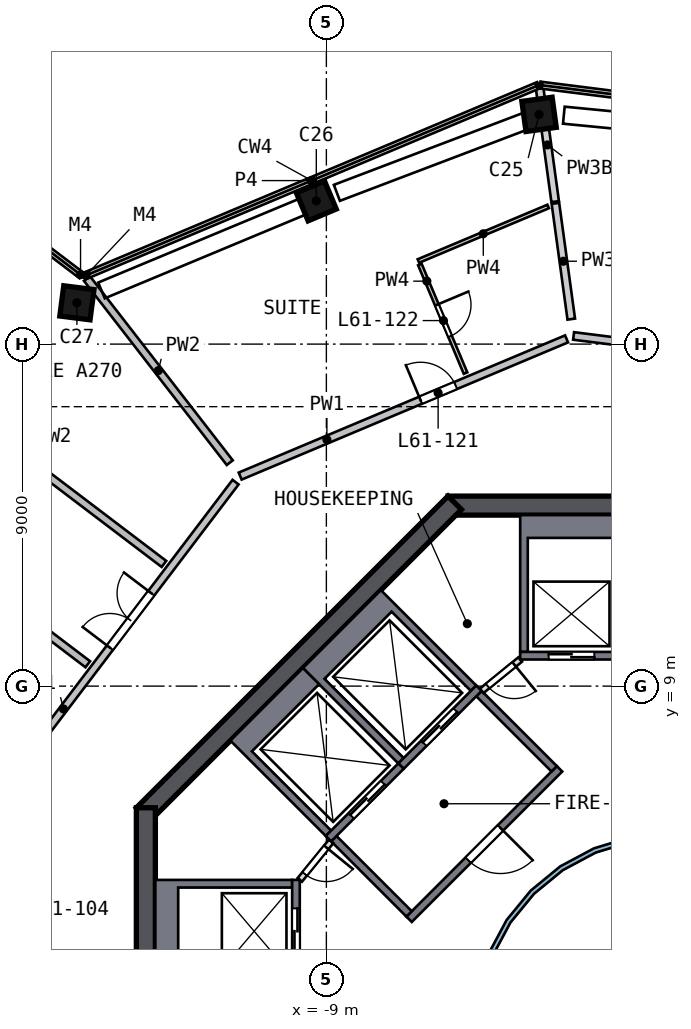
"""IFC4 building model, lengths in metres.
Left out: names, types, materials, properties, quantities, classifications, styles, units other than length and angle.
Written with IfcOpenShell. Run it as: python <this file> out.ifc"""

import sys

from ifc_helpers import new_model, si_unit, direction, frame, frame_2d, origin, origin_2d, place, context, subcontext, project, spatial, polyline, rectangle, outline, extrude, element, fill, save


model = new_model("IFC4")
c1 = context("Model", 3, precision=1e-05, world=origin(), true_north=direction((0.0, 1.0)))
c2 = subcontext(c1, "Body", "Model", "MODEL_VIEW")
j1 = project(units=[si_unit("LENGTHUNIT", "METRE"), si_unit("PLANEANGLEUNIT", "RADIAN")], contexts=[c1])
p1 = place(None, origin())
s1 = spatial("IfcSite", under=j1, at=p1, CompositionType="ELEMENT")
p2 = place(p1, origin())
s2 = spatial("IfcBuilding", under=s1, at=p2, CompositionType="ELEMENT")
p3 = place(p2, frame((0.0, 0.0, 248.0)))
s3 = spatial("IfcBuildingStorey", under=s2, at=p3, CompositionType="ELEMENT", Elevation=248.0)
p4 = place(p3, frame((-3.296, 24.061, 0.0), z_axis=(-0.089136206, -0.01299903, 0.995934617), x_axis=(0.986689244, 0.13539081, 0.090075878)))
e1 = element("IfcColumn", 1, at=p4, inside=s3, PredefinedType="COLUMN", context=c2, shape_type="SweptSolid", body=[
    extrude(rectangle(XDim=0.8, YDim=0.8, at=origin_2d()), origin(), (0.0, 0.0, 1.0), 4.207),
])
p5 = place(p3, frame((-9.168, 21.81, 0.0), z_axis=(-0.080622231, -0.034709931, 0.996140189), x_axis=(-0.918242206, -0.386169745, -0.087773449)))
e2 = element("IfcColumn", 2, at=p5, inside=s3, PredefinedType="COLUMN", context=c2, shape_type="SweptSolid", body=[
    extrude(rectangle(XDim=0.8, YDim=0.8, at=origin_2d()), origin(), (0.0, 0.0, 1.0), 4.206),
])
p6 = place(p3, frame((-15.479, 19.157, 0.0), z_axis=(-0.070500208, -0.058024863, 0.995822693), x_axis=(0.989720442, -0.128599478, 0.062574925)))
e3 = element("IfcColumn", 3, at=p6, inside=s3, PredefinedType="COLUMN", context=c2, shape_type="SweptSolid", body=[
    extrude(rectangle(XDim=0.8, YDim=0.8, at=origin_2d()), origin(), (0.0, 0.0, 1.0), 4.208),
])
p7 = place(p3, frame((5.799, 13.75, 0.0), z_axis=(0.0, 0.0, 1.0), x_axis=(-1.0, 0.0, 0.0)))
e4 = element("IfcWall", 4, at=p7, inside=s3, PredefinedType="SHEAR", context=c2, shape_type="SweptSolid", body=[
    extrude(rectangle(XDim=11.598, YDim=0.5, at=frame_2d((5.799, 0.0))), origin(), (0.0, 0.0, 1.0), 4.5),
])
p8 = place(p7, frame((4.899, 0.0, 0.0)))
e5 = element("IfcOpeningElement", 5, at=p8, cuts=e4, PredefinedType="OPENING", context=c2, shape_type="SweptSolid", body=[
    extrude(rectangle(XDim=1.8, YDim=2.1, at=frame_2d((0.9, 1.05))), frame((0.0, 0.26, 0.0), z_axis=(0.0, -1.0, 0.0), x_axis=(1.0, 0.0, 0.0)), (0.0, 0.0, 1.0), 0.52),
])
p9 = place(p3, frame((-5.622, 13.823, 0.0), z_axis=(0.0, 0.0, 1.0), x_axis=(-0.707106781, -0.707106781, 0.0)))
e6 = element("IfcWall", 6, at=p9, inside=s3, PredefinedType="SHEAR", context=c2, shape_type="SweptSolid", body=[
    extrude(rectangle(XDim=11.598, YDim=0.5, at=frame_2d((5.799, 0.0))), origin(), (0.0, 0.0, 1.0), 4.5),
])
p10 = place(p3, frame((-13.75, 5.799, 0.0), z_axis=(0.0, 0.0, 1.0), x_axis=(0.0, -1.0, 0.0)))
e7 = element("IfcWall", 7, at=p10, inside=s3, PredefinedType="SHEAR", context=c2, shape_type="SweptSolid", body=[
    extrude(rectangle(XDim=11.598, YDim=0.5, at=frame_2d((5.799, 0.0))), origin(), (0.0, 0.0, 1.0), 4.5),
])
p11 = place(p10, frame((4.899, 0.0, 0.0)))
e8 = element("IfcOpeningElement", 8, at=p11, cuts=e7, PredefinedType="OPENING", context=c2, shape_type="SweptSolid", body=[
    extrude(rectangle(XDim=1.8, YDim=2.1, at=frame_2d((0.9, 1.05))), frame((0.0, 0.26, 0.0), z_axis=(0.0, -1.0, 0.0), x_axis=(1.0, 0.0, 0.0)), (0.0, 0.0, 1.0), 0.52),
])
p12 = place(p3, origin())
e9 = element("IfcWall", 9, at=p12, inside=s3, PredefinedType="SOLIDWALL", context=c2, shape_type="SweptSolid", body=[
    extrude(outline(polyline([(-3.9, 13.5), (-1.2, 13.5), (-1.2, 9.9), (-1.4, 9.9), (-1.4, 12.9), (-3.7, 12.9), (-3.7, 9.9), (-3.9, 9.9), (-3.9, 13.5)])), origin(), (0.0, 0.0, 1.0), 4.19),
])
p13 = place(p3, frame((-1.2, 9.8, 0.0), z_axis=(0.0, 0.0, 1.0), x_axis=(-1.0, 0.0, 0.0)))
e10 = element("IfcWall", 10, at=p13, inside=s3, PredefinedType="SOLIDWALL", context=c2, shape_type="SweptSolid", body=[
    extrude(rectangle(XDim=2.7, YDim=0.2, at=frame_2d((1.35, 0.0))), origin(), (0.0, 0.0, 1.0), 4.19),
])
p14 = place(p13, frame((0.75, 0.0, 0.0)))
e11 = element("IfcOpeningElement", 11, at=p14, cuts=e10, PredefinedType="OPENING", context=c2, shape_type="SweptSolid", body=[
    extrude(rectangle(XDim=1.2, YDim=2.1, at=frame_2d((0.6, 1.05))), frame((0.0, 0.11, 0.0), z_axis=(0.0, -1.0, 0.0), x_axis=(1.0, 0.0, 0.0)), (0.0, 0.0, 1.0), 0.22),
])
p15 = place(p3, origin())
e12 = element("IfcWall", 12, at=p15, inside=s3, PredefinedType="SOLIDWALL", context=c2, shape_type="SweptSolid", body=[
    extrude(outline(polyline([(-13.5, 3.9), (-9.9, 3.9), (-9.9, 3.7), (-12.9, 3.7), (-12.9, 1.4), (-9.9, 1.4), (-9.9, 1.2), (-13.5, 1.2), (-13.5, 3.9)])), origin(), (0.0, 0.0, 1.0), 4.19),
])
p16 = place(p3, frame((-9.8, 1.2, 0.0), z_axis=(0.0, 0.0, 1.0), x_axis=(0.0, 1.0, 0.0)))
e13 = element("IfcWall", 13, at=p16, inside=s3, PredefinedType="SOLIDWALL", context=c2, shape_type="SweptSolid", body=[
    extrude(rectangle(XDim=2.7, YDim=0.2, at=frame_2d((1.35, 0.0))), origin(), (0.0, 0.0, 1.0), 4.19),
])
p17 = place(p16, frame((0.75, 0.0, 0.0)))
e14 = element("IfcOpeningElement", 14, at=p17, cuts=e13, PredefinedType="OPENING", context=c2, shape_type="SweptSolid", body=[
    extrude(rectangle(XDim=1.2, YDim=2.1, at=frame_2d((0.6, 1.05))), frame((0.0, 0.11, 0.0), z_axis=(0.0, -1.0, 0.0), x_axis=(1.0, 0.0, 0.0)), (0.0, 0.0, 1.0), 0.22),
])
p18 = place(p3, origin())
e15 = element("IfcWall", 15, at=p18, inside=s3, PredefinedType="SOLIDWALL", context=c2, shape_type="SweptSolid", body=[
    extrude(outline(polyline([(-9.617, 9.475), (-7.566, 11.526), (-5.056, 9.016), (-5.197, 8.874), (-7.283, 10.96), (-9.051, 9.192), (-6.965, 7.106), (-7.106, 6.965), (-9.617, 9.475)])), origin(), (0.0, 0.0, 1.0), 4.19),
])
p19 = place(p3, frame((-4.985, 8.945, 0.0), z_axis=(0.0, 0.0, 1.0), x_axis=(-0.707106781, -0.707106781, 0.0)))
e16 = element("IfcWall", 16, at=p19, inside=s3, PredefinedType="SOLIDWALL", context=c2, shape_type="SweptSolid", body=[
    extrude(rectangle(XDim=2.9, YDim=0.2, at=frame_2d((1.45, 0.0))), origin(), (0.0, 0.0, 1.0), 4.19),
])
p20 = place(p19, frame((0.85, 0.0, 0.0)))
e17 = element("IfcOpeningElement", 17, at=p20, cuts=e16, PredefinedType="OPENING", context=c2, shape_type="SweptSolid", body=[
    extrude(rectangle(XDim=1.2, YDim=2.1, at=frame_2d((0.6, 1.05))), frame((0.0, 0.11, 0.0), z_axis=(0.0, -1.0, 0.0), x_axis=(1.0, 0.0, 0.0)), (0.0, 0.0, 1.0), 0.22),
])
p21 = place(p3, origin())
e18 = element("IfcWall", 18, at=p21, inside=s3, PredefinedType="SOLIDWALL", context=c2, shape_type="SweptSolid", body=[
    extrude(outline(polyline([(-11.526, 7.566), (-9.617, 9.475), (-9.192, 9.051), (-10.96, 7.283), (-8.874, 5.197), (-9.016, 5.056), (-11.526, 7.566)])), origin(), (0.0, 0.0, 1.0), 4.19),
])
p22 = place(p3, frame((-7.036, 6.894, 0.0), z_axis=(0.0, 0.0, 1.0), x_axis=(-0.707106781, -0.707106781, 0.0)))
e19 = element("IfcWall", 19, at=p22, inside=s3, PredefinedType="SOLIDWALL", context=c2, shape_type="SweptSolid", body=[
    extrude(rectangle(XDim=2.7, YDim=0.2, at=frame_2d((1.35, 0.0))), origin(), (0.0, 0.0, 1.0), 4.19),
])
p23 = place(p22, frame((0.65, 0.0, 0.0)))
e20 = element("IfcOpeningElement", 20, at=p23, cuts=e19, PredefinedType="OPENING", context=c2, shape_type="SweptSolid", body=[
    extrude(rectangle(XDim=1.2, YDim=2.1, at=frame_2d((0.6, 1.05))), frame((0.0, 0.11, 0.0), z_axis=(0.0, -1.0, 0.0), x_axis=(1.0, 0.0, 0.0)), (0.0, 0.0, 1.0), 0.22),
])
p24 = place(p3, frame((-2.864, 6.823, 0.0), z_axis=(0.0, 0.0, 1.0), x_axis=(-0.707106781, -0.707106781, 0.0)))
e21 = element("IfcWall", 21, at=p24, inside=s3, PredefinedType="SOLIDWALL", context=c2, shape_type="SweptSolid", body=[
    extrude(rectangle(XDim=5.6, YDim=0.2, at=frame_2d((2.8, 0.0))), origin(), (0.0, 0.0, 1.0), 4.19),
])
p25 = place(p24, frame((2.2, 0.0, 0.0)))
e22 = element("IfcOpeningElement", 22, at=p25, cuts=e21, PredefinedType="OPENING", context=c2, shape_type="SweptSolid", body=[
    extrude(rectangle(XDim=1.2, YDim=2.1, at=frame_2d((0.6, 1.05))), frame((0.0, 0.11, 0.0), z_axis=(0.0, -1.0, 0.0), x_axis=(1.0, 0.0, 0.0)), (0.0, 0.0, 1.0), 0.22),
])
for number, where, z_axis, x_axis in (
    (23, (-3.005, 6.823, 0.0), (0.0, 0.0, 1.0), (-0.707, 0.707, 0.0)),
    (24, (-6.823, 3.005, 0.0), (0.0, 0.0, 1.0), (-0.707, 0.707, 0.0)),
):
    element("IfcWall", number, at=place(p3, frame(where, z_axis=z_axis, x_axis=x_axis)), inside=s3, PredefinedType="SOLIDWALL", context=c2, shape_type="SweptSolid", body=[
        extrude(rectangle(XDim=2.8, YDim=0.2, at=frame_2d((1.4, 0.0))), origin(), (0.0, 0.0, 1.0), 4.19),
    ])
p26 = place(p3, frame((-3.9, 9.7, 0.0), z_axis=(0.0, 0.0, 1.0), x_axis=(-0.775559878, -0.631274009, 0.0)))
e25 = element("IfcWall", 25, at=p26, inside=s3, PredefinedType="PARTITIONING", context=c2, shape_type="SweptSolid", body=[
    extrude(rectangle(XDim=1.308, YDim=0.15, at=frame_2d((0.654, 0.0))), origin(), (0.0, 0.0, 1.0), 4.19),
])
p27 = place(p26, frame((0.204, 0.0, 0.0)))
e26 = element("IfcOpeningElement", 26, at=p27, cuts=e25, PredefinedType="OPENING", context=c2, shape_type="SweptSolid", body=[
    extrude(rectangle(XDim=0.9, YDim=2.1, at=frame_2d((0.45, 1.05))), frame((0.0, 0.085, 0.0), z_axis=(0.0, -1.0, 0.0), x_axis=(1.0, 0.0, 0.0)), (0.0, 0.0, 1.0), 0.17),
])
p28 = place(p3, frame((-8.874, 4.914, 0.0), z_axis=(0.0, 0.0, 1.0), x_axis=(-0.631274009, -0.775559878, 0.0)))
e27 = element("IfcWall", 27, at=p28, inside=s3, PredefinedType="PARTITIONING", context=c2, shape_type="SweptSolid", body=[
    extrude(rectangle(XDim=1.308, YDim=0.15, at=frame_2d((0.654, 0.0))), origin(), (0.0, 0.0, 1.0), 4.19),
])
p29 = place(p28, frame((0.204, 0.0, 0.0)))
e28 = element("IfcOpeningElement", 28, at=p29, cuts=e27, PredefinedType="OPENING", context=c2, shape_type="SweptSolid", body=[
    extrude(rectangle(XDim=0.9, YDim=2.1, at=frame_2d((0.45, 1.05))), frame((0.0, 0.085, 0.0), z_axis=(0.0, -1.0, 0.0), x_axis=(1.0, 0.0, 0.0)), (0.0, 0.0, 1.0), 0.17),
])
p30 = place(p3, origin())
e29 = element("IfcWall", 29, at=p30, inside=s3, PredefinedType="SOLIDWALL", context=c2, shape_type="SweptSolid", body=[
    extrude(outline(polyline([(5.021, -0.999), (4.73, -1.959), (4.257, -2.844), (3.62, -3.62), (2.844, -4.257), (1.959, -4.73), (0.999, -5.021), (0.0, -5.12), (-0.999, -5.021), (-1.959, -4.73), (-2.844, -4.257), (-3.62, -3.62), (-4.257, -2.844), (-4.73, -1.959), (-5.021, -0.999), (-5.12, 0.0), (-5.021, 0.999), (-4.73, 1.959), (-4.257, 2.844), (-3.62, 3.62), (-2.844, 4.257), (-1.959, 4.73), (-0.999, 5.021), (0.0, 5.12), (0.999, 5.021), (1.959, 4.73), (2.844, 4.257), (3.62, 3.62), (4.257, 2.844), (4.73, 1.959), (5.021, 0.999), (5.12, 0.0), (5.021, -0.999)]), holes=[polyline([(4.904, 0.976), (4.619, 1.913), (4.157, 2.778), (3.535, 3.535), (2.778, 4.157), (1.913, 4.619), (0.976, 4.904), (0.0, 5.0), (-0.976, 4.904), (-1.913, 4.619), (-2.778, 4.157), (-3.535, 3.535), (-4.157, 2.778), (-4.619, 1.913), (-4.904, 0.976), (-5.0, 0.0), (-4.904, -0.976), (-4.619, -1.913), (-4.157, -2.778), (-3.535, -3.535), (-2.778, -4.157), (-1.913, -4.619), (-0.976, -4.904), (0.0, -5.0), (0.976, -4.904), (1.913, -4.619), (2.778, -4.157), (3.535, -3.535), (4.157, -2.778), (4.619, -1.913), (4.904, -0.976), (5.0, 0.0), (4.904, 0.976)])]), origin(), (0.0, 0.0, 1.0), 4.19),
])
p31 = place(p3, frame((-17.022, 6.947, 0.0), z_axis=(0.0, 0.0, 1.0), x_axis=(0.604602112, 0.796527643, 0.0)))
e30 = element("IfcWall", 30, at=p31, inside=s3, PredefinedType="SOLIDWALL", context=c2, shape_type="SweptSolid", body=[
    extrude(rectangle(XDim=9.317, YDim=0.2, at=frame_2d((4.658, 0.0))), origin(), (0.0, 0.0, 1.0), 4.19),
])
p32 = place(p31, frame((3.848, 0.0, 0.0)))
e31 = element("IfcOpeningElement", 31, at=p32, cuts=e30, PredefinedType="OPENING", context=c2, shape_type="SweptSolid", body=[
    extrude(rectangle(XDim=1.8, YDim=2.1, at=frame_2d((0.9, 1.05))), frame((0.0, 0.11, 0.0), z_axis=(0.0, -1.0, 0.0), x_axis=(1.0, 0.0, 0.0)), (0.0, 0.0, 1.0), 0.22),
])
p33 = place(p3, frame((-11.268, 14.527, 0.0), z_axis=(0.0, 0.0, 1.0), x_axis=(0.921862121, 0.387518038, 0.0)))
e32 = element("IfcWall", 32, at=p33, inside=s3, PredefinedType="SOLIDWALL", context=c2, shape_type="SweptSolid", body=[
    extrude(rectangle(XDim=9.317, YDim=0.2, at=frame_2d((4.658, 0.0))), origin(), (0.0, 0.0, 1.0), 4.19),
])
p34 = place(p33, frame((5.15, 0.0, 0.0)))
e33 = element("IfcOpeningElement", 33, at=p34, cuts=e32, PredefinedType="OPENING", context=c2, shape_type="SweptSolid", body=[
    extrude(rectangle(XDim=1.0, YDim=2.1, at=frame_2d((0.5, 1.05))), frame((0.0, 0.11, 0.0), z_axis=(0.0, -1.0, 0.0), x_axis=(1.0, 0.0, 0.0)), (0.0, 0.0, 1.0), 0.22),
])
p35 = place(p3, frame((-2.495, 18.215, 0.0), z_axis=(0.0, 0.0, 1.0), x_axis=(0.992116583, -0.125318334, 0.0)))
e34 = element("IfcWall", 34, at=p35, inside=s3, PredefinedType="SOLIDWALL", context=c2, shape_type="SweptSolid", body=[
    extrude(rectangle(XDim=9.316, YDim=0.2, at=frame_2d((4.658, 0.0))), origin(), (0.0, 0.0, 1.0), 4.19),
])
p36 = place(p35, frame((1.95, 0.0, 0.0)))
e35 = element("IfcOpeningElement", 35, at=p36, cuts=e34, PredefinedType="OPENING", context=c2, shape_type="SweptSolid", body=[
    extrude(rectangle(XDim=0.9, YDim=2.1, at=frame_2d((0.45, 1.05))), frame((0.0, 0.11, 0.0), z_axis=(0.0, -1.0, 0.0), x_axis=(1.0, 0.0, 0.0)), (0.0, 0.0, 1.0), 0.22),
])
p37 = place(p3, frame((-15.278, 9.575, 0.0), z_axis=(0.0, 0.0, 1.0), x_axis=(-0.796522166, 0.604609328, 0.0)))
e36 = element("IfcWall", 36, at=p37, inside=s3, PredefinedType="SOLIDWALL", context=c2, shape_type="SweptSolid", body=[
    extrude(rectangle(XDim=14.697, YDim=0.2, at=frame_2d((7.349, 0.0))), origin(), (0.0, 0.0, 1.0), 4.19),
])
p38 = place(p37, frame((4.55, 0.0, 0.0)))
e37 = element("IfcOpeningElement", 37, at=p38, cuts=e36, PredefinedType="OPENING", context=c2, shape_type="SweptSolid", body=[
    extrude(rectangle(XDim=1.0, YDim=2.1, at=frame_2d((0.5, 1.05))), frame((0.0, 0.11, 0.0), z_axis=(0.0, -1.0, 0.0), x_axis=(1.0, 0.0, 0.0)), (0.0, 0.0, 1.0), 0.22),
])
p39 = place(p3, frame((-24.981, 21.101, 0.0), z_axis=(0.0, 0.0, 1.0), x_axis=(0.796536238, -0.604590789, 0.0)))
e38 = element("IfcWall", 38, at=p39, inside=s3, PredefinedType="SOLIDWALL", context=c2, shape_type="SweptSolid", body=[
    extrude(rectangle(XDim=14.697, YDim=0.2, at=frame_2d((7.349, 0.0))), origin(), (0.0, 0.0, 1.0), 4.19),
])
p40 = place(p39, frame((4.6, 0.0, 0.0)))
e39 = element("IfcOpeningElement", 39, at=p40, cuts=e38, PredefinedType="OPENING", context=c2, shape_type="SweptSolid", body=[
    extrude(rectangle(XDim=1.0, YDim=2.1, at=frame_2d((0.5, 1.05))), frame((0.0, 0.11, 0.0), z_axis=(0.0, -1.0, 0.0), x_axis=(1.0, 0.0, 0.0)), (0.0, 0.0, 1.0), 0.22),
])
p41 = place(p3, frame((-15.301, 19.726, 0.0), z_axis=(0.0, 0.0, 1.0), x_axis=(0.61290926, -0.790153301, 0.0)))
e40 = element("IfcWall", 40, at=p41, inside=s3, PredefinedType="SOLIDWALL", context=c2, shape_type="SweptSolid", body=[
    extrude(rectangle(XDim=6.132, YDim=0.2, at=frame_2d((3.066, 0.0))), origin(), (0.0, 0.0, 1.0), 4.19),
])
p42 = place(p3, frame((-6.54, 20.094, 0.0), z_axis=(0.0, 0.0, 1.0), x_axis=(0.3875605, -0.92184427, 0.0)))
e41 = element("IfcWall", 41, at=p42, inside=s3, PredefinedType="PARTITIONING", context=c2, shape_type="SweptSolid", body=[
    extrude(rectangle(XDim=3.1, YDim=0.1, at=frame_2d((1.55, 0.0))), origin(), (0.0, 0.0, 1.0), 4.19),
])
p43 = place(p42, frame((1.15, 0.0, 0.0)))
e42 = element("IfcOpeningElement", 42, at=p43, cuts=e41, PredefinedType="OPENING", context=c2, shape_type="SweptSolid", body=[
    extrude(rectangle(XDim=0.9, YDim=2.1, at=frame_2d((0.45, 1.05))), frame((0.0, 0.06, 0.0), z_axis=(0.0, -1.0, 0.0), x_axis=(1.0, 0.0, 0.0)), (0.0, 0.0, 1.0), 0.12),
])
p44 = place(p3, frame((-6.578, 20.187, 0.0), z_axis=(0.0, 0.0, 1.0), x_axis=(0.921857328, 0.387529441, 0.0)))
e43 = element("IfcWall", 43, at=p44, inside=s3, PredefinedType="PARTITIONING", context=c2, shape_type="SweptSolid", body=[
    extrude(rectangle(XDim=3.704, YDim=0.1, at=frame_2d((1.852, 0.0))), origin(), (0.0, 0.0, 1.0), 4.19),
])
p45 = place(p3, frame((-2.979, 21.75, 0.0), z_axis=(0.0, 0.0, 1.0), x_axis=(-0.135710101, 0.99074859, 0.0)))
e44 = element("IfcWall", 44, at=p45, inside=s3, PredefinedType="SOLIDWALL", context=c2, shape_type="SweptSolid", body=[
    extrude(rectangle(XDim=3.011, YDim=0.2, at=frame_2d((1.506, 0.0))), origin(), (0.0, 0.0, 1.0), 3.69),
])
p46 = place(p3, frame((-2.556, 18.658, 0.0), z_axis=(0.0, 0.0, 1.0), x_axis=(-0.135694266, 0.990750759, 0.0)))
e45 = element("IfcWall", 45, at=p46, inside=s3, PredefinedType="SOLIDWALL", context=c2, shape_type="SweptSolid", body=[
    extrude(rectangle(XDim=3.075, YDim=0.2, at=frame_2d((1.537, 0.0))), origin(), (0.0, 0.0, 1.0), 4.19),
])
p47 = place(p14, origin())
e46 = element("IfcDoor", 46, at=p47, inside=s3, OperationType="DOUBLE_DOOR_SLIDING", PredefinedType="DOOR", context=c2, shape_type="SweptSolid", body=[
    extrude(rectangle(XDim=1.2, YDim=2.1, at=frame_2d((0.6, 1.05))), frame((0.0, 0.025, 0.0), z_axis=(0.0, -1.0, 0.0), x_axis=(1.0, 0.0, 0.0)), (0.0, 0.0, 1.0), 0.05),
])
fill(e11, e46)
p48 = place(p17, origin())
e47 = element("IfcDoor", 47, at=p48, inside=s3, OperationType="DOUBLE_DOOR_SLIDING", PredefinedType="DOOR", context=c2, shape_type="SweptSolid", body=[
    extrude(rectangle(XDim=1.2, YDim=2.1, at=frame_2d((0.6, 1.05))), frame((0.0, 0.025, 0.0), z_axis=(0.0, -1.0, 0.0), x_axis=(1.0, 0.0, 0.0)), (0.0, 0.0, 1.0), 0.05),
])
fill(e14, e47)
p49 = place(p20, origin())
e48 = element("IfcDoor", 48, at=p49, inside=s3, OperationType="DOUBLE_DOOR_SLIDING", PredefinedType="DOOR", context=c2, shape_type="SweptSolid", body=[
    extrude(rectangle(XDim=1.2, YDim=2.1, at=frame_2d((0.6, 1.05))), frame((0.0, 0.025, 0.0), z_axis=(0.0, -1.0, 0.0), x_axis=(1.0, 0.0, 0.0)), (0.0, 0.0, 1.0), 0.05),
])
fill(e17, e48)
p50 = place(p23, origin())
e49 = element("IfcDoor", 49, at=p50, inside=s3, OperationType="DOUBLE_DOOR_SLIDING", PredefinedType="DOOR", context=c2, shape_type="SweptSolid", body=[
    extrude(rectangle(XDim=1.2, YDim=2.1, at=frame_2d((0.6, 1.05))), frame((0.0, 0.025, 0.0), z_axis=(0.0, -1.0, 0.0), x_axis=(1.0, 0.0, 0.0)), (0.0, 0.0, 1.0), 0.05),
])
fill(e20, e49)
p51 = place(p25, origin())
e50 = element("IfcDoor", 50, at=p51, inside=s3, OperationType="SINGLE_SWING_LEFT", PredefinedType="DOOR", context=c2, shape_type="SweptSolid", body=[
    extrude(rectangle(XDim=1.2, YDim=2.1, at=frame_2d((0.6, 1.05))), frame((0.0, 0.025, 0.0), z_axis=(0.0, -1.0, 0.0), x_axis=(1.0, 0.0, 0.0)), (0.0, 0.0, 1.0), 0.05),
])
fill(e22, e50)
p52 = place(p27, origin())
e51 = element("IfcDoor", 51, at=p52, inside=s3, OperationType="SINGLE_SWING_LEFT", PredefinedType="DOOR", context=c2, shape_type="SweptSolid", body=[
    extrude(rectangle(XDim=0.9, YDim=2.1, at=frame_2d((0.45, 1.05))), frame((0.0, 0.025, 0.0), z_axis=(0.0, -1.0, 0.0), x_axis=(1.0, 0.0, 0.0)), (0.0, 0.0, 1.0), 0.05),
])
fill(e26, e51)
p53 = place(p29, origin())
e52 = element("IfcDoor", 52, at=p53, inside=s3, OperationType="SINGLE_SWING_LEFT", PredefinedType="DOOR", context=c2, shape_type="SweptSolid", body=[
    extrude(rectangle(XDim=0.9, YDim=2.1, at=frame_2d((0.45, 1.05))), frame((0.0, 0.025, 0.0), z_axis=(0.0, -1.0, 0.0), x_axis=(1.0, 0.0, 0.0)), (0.0, 0.0, 1.0), 0.05),
])
fill(e28, e52)
p54 = place(p32, origin())
e53 = element("IfcDoor", 53, at=p54, inside=s3, OperationType="DOUBLE_DOOR_SINGLE_SWING", PredefinedType="DOOR", context=c2, shape_type="SweptSolid", body=[
    extrude(rectangle(XDim=1.8, YDim=2.1, at=frame_2d((0.9, 1.05))), frame((0.0, 0.025, 0.0), z_axis=(0.0, -1.0, 0.0), x_axis=(1.0, 0.0, 0.0)), (0.0, 0.0, 1.0), 0.05),
])
fill(e31, e53)
p55 = place(p34, origin())
e54 = element("IfcDoor", 54, at=p55, inside=s3, OperationType="SINGLE_SWING_LEFT", PredefinedType="DOOR", context=c2, shape_type="SweptSolid", body=[
    extrude(rectangle(XDim=1.0, YDim=2.1, at=frame_2d((0.5, 1.05))), frame((0.0, 0.025, 0.0), z_axis=(0.0, -1.0, 0.0), x_axis=(1.0, 0.0, 0.0)), (0.0, 0.0, 1.0), 0.05),
])
fill(e33, e54)
p56 = place(p43, origin())
e55 = element("IfcDoor", 55, at=p56, inside=s3, OperationType="SINGLE_SWING_LEFT", PredefinedType="DOOR", context=c2, shape_type="SweptSolid", body=[
    extrude(rectangle(XDim=0.9, YDim=2.1, at=frame_2d((0.45, 1.05))), frame((0.0, 0.025, 0.0), z_axis=(0.0, -1.0, 0.0), x_axis=(1.0, 0.0, 0.0)), (0.0, 0.0, 1.0), 0.05),
])
fill(e42, e55)
save(model, sys.argv[1])
